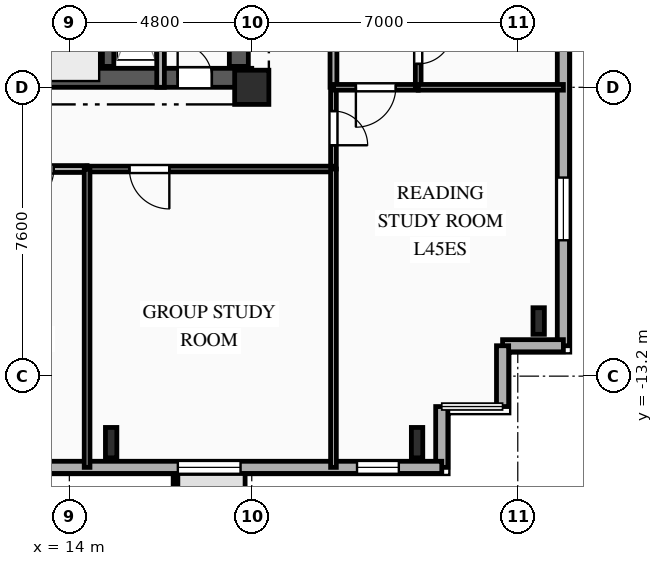
"""IFC4 building model, lengths in metres.
Left out: names, types, materials, properties, quantities, classifications, styles, units other than length and angle.
Written with IfcOpenShell. Run it as: python <this file> out.ifc"""

import sys

from ifc_helpers import new_model, si_unit, direction, frame, frame_2d, origin, origin_2d, place, context, subcontext, project, spatial, rectangle, i_section, extrude, element, fill, save


model = new_model("IFC4")
c1 = context("Model", 3, precision=1e-05, world=origin(), true_north=direction((0.0, 1.0)))
c2 = subcontext(c1, "Body", "Model", "MODEL_VIEW")
j1 = project(units=[si_unit("LENGTHUNIT", "METRE"), si_unit("PLANEANGLEUNIT", "RADIAN")], contexts=[c1])
p1 = place(None, origin())
s1 = spatial("IfcSite", under=j1, at=p1, CompositionType="ELEMENT")
p2 = place(p1, origin())
s2 = spatial("IfcBuilding", under=s1, at=p2, CompositionType="ELEMENT")
p3 = place(p2, frame((0.0, 0.0, 161.15)))
s3 = spatial("IfcBuildingStorey", under=s2, at=p3, CompositionType="ELEMENT", Elevation=161.15)
p4 = place(p3, frame((18.8, -5.6, 0.0), z_axis=(0.0, 0.0, 1.0), x_axis=(1.0, 0.0, 0.0)))
e1 = element("IfcColumn", 1, at=p4, inside=s3, PredefinedType="COLUMN", context=c2, shape_type="SweptSolid", body=[
    extrude(rectangle(XDim=0.9, YDim=0.9, at=origin_2d()), origin(), (0.0, 0.0, 1.0), 3.35),
])
for number, where, z_axis, x_axis in (
    (2, (15.1, -14.95, 0.0), (0.0, 0.0, 1.0), (1.0, 0.0, 0.0)),
    (3, (23.15, -14.95, 0.0), (0.0, 0.0, 1.0), (1.0, 0.0, 0.0)),
):
    element("IfcColumn", number, at=place(p3, frame(where, z_axis=z_axis, x_axis=x_axis)), inside=s3, PredefinedType="COLUMN", context=c2, shape_type="SweptSolid", body=[
        extrude(i_section(OverallWidth=0.3, OverallDepth=0.8, WebThickness=0.018, FlangeThickness=0.033, FilletRadius=0.03, at=origin_2d()), origin(), (0.0, 0.0, 1.0), 3.35),
    ])
p5 = place(p3, frame((26.35, -11.75, 0.0), z_axis=(0.0, 0.0, 1.0), x_axis=(1.0, 0.0, 0.0)))
e4 = element("IfcColumn", 4, at=p5, inside=s3, PredefinedType="COLUMN", context=c2, shape_type="SweptSolid", body=[
    extrude(i_section(OverallWidth=0.3, OverallDepth=0.7, WebThickness=0.017, FlangeThickness=0.032, FilletRadius=0.027, at=origin_2d()), origin(), (0.0, 0.0, 1.0), 3.35),
])
p6 = place(p3, frame((27.0, 17.2, 0.0), z_axis=(0.0, 0.0, 1.0), x_axis=(0.0, -1.0, 0.0)))
e5 = element("IfcWall", 5, at=p6, inside=s3, PredefinedType="SOLIDWALL", context=c2, shape_type="SweptSolid", body=[
    extrude(rectangle(XDim=29.6, YDim=0.32, at=frame_2d((14.8, 0.0))), origin(), (0.0, 0.0, 1.0), 3.04),
])
p7 = place(p6, frame((3.775, 0.0, 0.85)))
e6 = element("IfcOpeningElement", 6, at=p7, cuts=e5, PredefinedType="OPENING", context=c2, shape_type="SweptSolid", body=[
    extrude(rectangle(XDim=1.65, YDim=1.85, at=frame_2d((0.825, 0.925))), frame((0.0, 0.17, 0.0), z_axis=(0.0, -1.0, 0.0), x_axis=(1.0, 0.0, 0.0)), (0.0, 0.0, 1.0), 0.34),
])
p8 = place(p6, frame((9.32, 0.0, 0.85)))
e7 = element("IfcOpeningElement", 7, at=p8, cuts=e5, PredefinedType="OPENING", context=c2, shape_type="SweptSolid", body=[
    extrude(rectangle(XDim=1.6, YDim=1.85, at=frame_2d((0.8, 0.925))), frame((0.0, 0.17, 0.0), z_axis=(0.0, -1.0, 0.0), x_axis=(1.0, 0.0, 0.0)), (0.0, 0.0, 1.0), 0.34),
])
p9 = place(p6, frame((12.2, 0.0, 0.85)))
e8 = element("IfcOpeningElement", 8, at=p9, cuts=e5, PredefinedType="OPENING", context=c2, shape_type="SweptSolid", body=[
    extrude(rectangle(XDim=1.6, YDim=1.85, at=frame_2d((0.8, 0.925))), frame((0.0, 0.17, 0.0), z_axis=(0.0, -1.0, 0.0), x_axis=(1.0, 0.0, 0.0)), (0.0, 0.0, 1.0), 0.34),
])
p10 = place(p6, frame((15.0, 0.0, 0.85)))
e9 = element("IfcOpeningElement", 9, at=p10, cuts=e5, PredefinedType="OPENING", context=c2, shape_type="SweptSolid", body=[
    extrude(rectangle(XDim=1.6, YDim=1.85, at=frame_2d((0.8, 0.925))), frame((0.0, 0.17, 0.0), z_axis=(0.0, -1.0, 0.0), x_axis=(1.0, 0.0, 0.0)), (0.0, 0.0, 1.0), 0.34),
])
p11 = place(p6, frame((17.865, 0.0, 0.85)))
e10 = element("IfcOpeningElement", 10, at=p11, cuts=e5, PredefinedType="OPENING", context=c2, shape_type="SweptSolid", body=[
    extrude(rectangle(XDim=1.95, YDim=1.85, at=frame_2d((0.975, 0.925))), frame((0.0, 0.17, 0.0), z_axis=(0.0, -1.0, 0.0), x_axis=(1.0, 0.0, 0.0)), (0.0, 0.0, 1.0), 0.34),
])
p12 = place(p6, frame((25.175, 0.0, 0.85)))
e11 = element("IfcOpeningElement", 11, at=p12, cuts=e5, PredefinedType="OPENING", context=c2, shape_type="SweptSolid", body=[
    extrude(rectangle(XDim=1.65, YDim=1.85, at=frame_2d((0.825, 0.925))), frame((0.0, 0.17, 0.0), z_axis=(0.0, -1.0, 0.0), x_axis=(1.0, 0.0, 0.0)), (0.0, 0.0, 1.0), 0.34),
])
for number, where, z_axis, x_axis in (
    (12, (27.0, -12.4, 0.0), (0.0, 0.0, 1.0), (-1.0, 0.0, 0.0)),
    (13, (25.4, -12.4, 0.0), (0.0, 0.0, 1.0), (0.0, -1.0, 0.0)),
    (14, (23.8, -14.0, 0.0), (0.0, 0.0, 1.0), (0.0, -1.0, 0.0)),
):
    element("IfcWall", number, at=place(p3, frame(where, z_axis=z_axis, x_axis=x_axis)), inside=s3, PredefinedType="SOLIDWALL", context=c2, shape_type="SweptSolid", body=[
        extrude(rectangle(XDim=1.6, YDim=0.32, at=frame_2d((0.8, 0.0))), origin(), (0.0, 0.0, 1.0), 3.04),
    ])
p13 = place(p3, frame((23.8, -15.6, 0.0), z_axis=(0.0, 0.0, 1.0), x_axis=(-1.0, 0.0, 0.0)))
e15 = element("IfcWall", 15, at=p13, inside=s3, PredefinedType="SOLIDWALL", context=c2, shape_type="SweptSolid", body=[
    extrude(rectangle(XDim=49.6, YDim=0.32, at=frame_2d((24.8, 0.0))), origin(), (0.0, 0.0, 1.0), 3.04),
])
p14 = place(p13, frame((1.13, 0.0, 0.85)))
e16 = element("IfcOpeningElement", 16, at=p14, cuts=e15, PredefinedType="OPENING", context=c2, shape_type="SweptSolid", body=[
    extrude(rectangle(XDim=1.1, YDim=1.85, at=frame_2d((0.55, 0.925))), frame((0.0, 0.17, 0.0), z_axis=(0.0, -1.0, 0.0), x_axis=(1.0, 0.0, 0.0)), (0.0, 0.0, 1.0), 0.34),
])
p15 = place(p13, frame((5.295, 0.0, 0.85)))
e17 = element("IfcOpeningElement", 17, at=p15, cuts=e15, PredefinedType="OPENING", context=c2, shape_type="SweptSolid", body=[
    extrude(rectangle(XDim=1.65, YDim=1.85, at=frame_2d((0.825, 0.925))), frame((0.0, 0.17, 0.0), z_axis=(0.0, -1.0, 0.0), x_axis=(1.0, 0.0, 0.0)), (0.0, 0.0, 1.0), 0.34),
])
p16 = place(p13, frame((11.74, 0.0, 0.85)))
e18 = element("IfcOpeningElement", 18, at=p16, cuts=e15, PredefinedType="OPENING", context=c2, shape_type="SweptSolid", body=[
    extrude(rectangle(XDim=2.2, YDim=1.85, at=frame_2d((1.1, 0.925))), frame((0.0, 0.17, 0.0), z_axis=(0.0, -1.0, 0.0), x_axis=(1.0, 0.0, 0.0)), (0.0, 0.0, 1.0), 0.34),
])
p17 = place(p13, frame((18.74, 0.0, 0.85)))
e19 = element("IfcOpeningElement", 19, at=p17, cuts=e15, PredefinedType="OPENING", context=c2, shape_type="SweptSolid", body=[
    extrude(rectangle(XDim=2.2, YDim=1.85, at=frame_2d((1.1, 0.925))), frame((0.0, 0.17, 0.0), z_axis=(0.0, -1.0, 0.0), x_axis=(1.0, 0.0, 0.0)), (0.0, 0.0, 1.0), 0.34),
])
p18 = place(p13, frame((25.74, 0.0, 0.85)))
e20 = element("IfcOpeningElement", 20, at=p18, cuts=e15, PredefinedType="OPENING", context=c2, shape_type="SweptSolid", body=[
    extrude(rectangle(XDim=2.2, YDim=1.85, at=frame_2d((1.1, 0.925))), frame((0.0, 0.17, 0.0), z_axis=(0.0, -1.0, 0.0), x_axis=(1.0, 0.0, 0.0)), (0.0, 0.0, 1.0), 0.34),
])
p19 = place(p13, frame((33.348, 0.0, 0.85)))
e21 = element("IfcOpeningElement", 21, at=p19, cuts=e15, PredefinedType="OPENING", context=c2, shape_type="SweptSolid", body=[
    extrude(rectangle(XDim=2.2, YDim=1.85, at=frame_2d((1.1, 0.925))), frame((0.0, 0.17, 0.0), z_axis=(0.0, -1.0, 0.0), x_axis=(1.0, 0.0, 0.0)), (0.0, 0.0, 1.0), 0.34),
])
p20 = place(p13, frame((38.972, 0.0, 0.85)))
e22 = element("IfcOpeningElement", 22, at=p20, cuts=e15, PredefinedType="OPENING", context=c2, shape_type="SweptSolid", body=[
    extrude(rectangle(XDim=1.65, YDim=1.85, at=frame_2d((0.825, 0.925))), frame((0.0, 0.17, 0.0), z_axis=(0.0, -1.0, 0.0), x_axis=(1.0, 0.0, 0.0)), (0.0, 0.0, 1.0), 0.34),
])
p21 = place(p13, frame((45.895, 0.0, 0.85)))
e23 = element("IfcOpeningElement", 23, at=p21, cuts=e15, PredefinedType="OPENING", context=c2, shape_type="SweptSolid", body=[
    extrude(rectangle(XDim=1.65, YDim=1.85, at=frame_2d((0.825, 0.925))), frame((0.0, 0.17, 0.0), z_axis=(0.0, -1.0, 0.0), x_axis=(1.0, 0.0, 0.0)), (0.0, 0.0, 1.0), 0.34),
])
p22 = place(p3, frame((9.2, -5.35, 0.0), z_axis=(0.0, 0.0, 1.0), x_axis=(1.0, 0.0, 0.0)))
e24 = element("IfcWall", 24, at=p22, inside=s3, PredefinedType="SHEAR", context=c2, shape_type="SweptSolid", body=[
    extrude(rectangle(XDim=9.6, YDim=0.5, at=frame_2d((4.8, 0.0))), origin(), (0.0, 0.0, 1.0), 3.04),
])
p23 = place(p22, frame((7.65, 0.0, 0.0)))
e25 = element("IfcOpeningElement", 25, at=p23, cuts=e24, PredefinedType="OPENING", context=c2, shape_type="SweptSolid", body=[
    extrude(rectangle(XDim=0.9, YDim=2.1, at=frame_2d((0.45, 1.05))), frame((0.0, 0.26, 0.0), z_axis=(0.0, -1.0, 0.0), x_axis=(1.0, 0.0, 0.0)), (0.0, 0.0, 1.0), 0.52),
])
p24 = place(p3, frame((18.46, -5.05, 0.0), z_axis=(0.0, 0.0, 1.0), x_axis=(0.0, 1.0, 0.0)))
e26 = element("IfcWall", 26, at=p24, inside=s3, PredefinedType="SHEAR", context=c2, shape_type="SweptSolid", body=[
    extrude(rectangle(XDim=10.1, YDim=0.5, at=frame_2d((5.05, 0.0))), origin(), (0.0, 0.0, 1.0), 3.04),
])
p25 = place(p3, frame((15.02, -5.05, 0.0), z_axis=(0.0, 0.0, 1.0), x_axis=(0.0, 1.0, 0.0)))
e27 = element("IfcWall", 27, at=p25, inside=s3, PredefinedType="SHEAR", context=c2, shape_type="SweptSolid", body=[
    extrude(rectangle(XDim=10.1, YDim=0.3, at=frame_2d((5.05, 0.0))), origin(), (0.0, 0.0, 1.0), 3.04),
])
p26 = place(p3, frame((16.4, -2.11, 0.0), z_axis=(0.0, 0.0, 1.0), x_axis=(0.0, -1.0, 0.0)))
e28 = element("IfcWall", 28, at=p26, inside=s3, PredefinedType="PARTITIONING", context=c2, shape_type="SweptSolid", body=[
    extrude(rectangle(XDim=3.49, YDim=0.2, at=frame_2d((1.745, 0.0))), origin(), (0.0, 0.0, 1.0), 3.04),
])
p27 = place(p3, frame((20.95, -5.6, 0.0), z_axis=(0.0, 0.0, 1.0), x_axis=(0.0, -1.0, 0.0)))
e29 = element("IfcWall", 29, at=p27, inside=s3, PredefinedType="PARTITIONING", context=c2, shape_type="SweptSolid", body=[
    extrude(rectangle(XDim=2.15, YDim=0.15, at=frame_2d((1.075, 0.0))), origin(), (0.0, 0.0, 1.0), 3.04),
])
p28 = place(p27, frame((0.625, 0.0, 0.0)))
e30 = element("IfcOpeningElement", 30, at=p28, cuts=e29, PredefinedType="OPENING", context=c2, shape_type="SweptSolid", body=[
    extrude(rectangle(XDim=0.9, YDim=2.1, at=frame_2d((0.45, 1.05))), frame((0.0, 0.085, 0.0), z_axis=(0.0, -1.0, 0.0), x_axis=(1.0, 0.0, 0.0)), (0.0, 0.0, 1.0), 0.17),
])
p29 = place(p3, frame((14.467, -7.75, 0.0), z_axis=(0.0, 0.0, 1.0), x_axis=(-1.0, 0.0, 0.0)))
e31 = element("IfcWall", 31, at=p29, inside=s3, PredefinedType="PARTITIONING", context=c2, shape_type="SweptSolid", body=[
    extrude(rectangle(XDim=4.534, YDim=0.18, at=frame_2d((2.267, 0.0))), origin(), (0.0, 0.0, 1.0), 3.04),
])
p30 = place(p29, frame((0.877, 0.0, 0.0)))
e32 = element("IfcOpeningElement", 32, at=p30, cuts=e31, PredefinedType="OPENING", context=c2, shape_type="SweptSolid", body=[
    extrude(rectangle(XDim=1.0, YDim=2.15, at=frame_2d((0.5, 1.075))), frame((0.0, 0.1, 0.0), z_axis=(0.0, -1.0, 0.0), x_axis=(1.0, 0.0, 0.0)), (0.0, 0.0, 1.0), 0.2),
])
p31 = place(p3, frame((20.95, -7.75, 0.0), z_axis=(0.0, 0.0, 1.0), x_axis=(-1.0, 0.0, 0.0)))
e33 = element("IfcWall", 33, at=p31, inside=s3, PredefinedType="PARTITIONING", context=c2, shape_type="SweptSolid", body=[
    extrude(rectangle(XDim=6.483, YDim=0.15, at=frame_2d((3.241, 0.0))), origin(), (0.0, 0.0, 1.0), 3.04),
])
p32 = place(p31, frame((4.319, 0.0, 0.0)))
e34 = element("IfcOpeningElement", 34, at=p32, cuts=e33, PredefinedType="OPENING", context=c2, shape_type="SweptSolid", body=[
    extrude(rectangle(XDim=1.05, YDim=2.15, at=frame_2d((0.525, 1.075))), frame((0.0, 0.085, 0.0), z_axis=(0.0, -1.0, 0.0), x_axis=(1.0, 0.0, 0.0)), (0.0, 0.0, 1.0), 0.17),
])
p33 = place(p3, frame((20.95, 8.5, 0.0), z_axis=(0.0, 0.0, 1.0), x_axis=(0.0, -1.0, 0.0)))
e35 = element("IfcWall", 35, at=p33, inside=s3, PredefinedType="PARTITIONING", context=c2, shape_type="SweptSolid", body=[
    extrude(rectangle(XDim=14.1, YDim=0.18, at=frame_2d((7.05, 0.0))), origin(), (0.0, 0.0, 1.0), 3.04),
])
p34 = place(p33, frame((8.042, 0.0, 0.0)))
e36 = element("IfcOpeningElement", 36, at=p34, cuts=e35, PredefinedType="OPENING", context=c2, shape_type="SweptSolid", body=[
    extrude(rectangle(XDim=1.0, YDim=2.15, at=frame_2d((0.5, 1.075))), frame((0.0, 0.1, 0.0), z_axis=(0.0, -1.0, 0.0), x_axis=(1.0, 0.0, 0.0)), (0.0, 0.0, 1.0), 0.2),
])
p35 = place(p3, frame((23.18, -5.6, 0.0), z_axis=(0.0, 0.0, 1.0), x_axis=(-1.0, 0.0, 0.0)))
e37 = element("IfcWall", 37, at=p35, inside=s3, PredefinedType="PARTITIONING", context=c2, shape_type="SweptSolid", body=[
    extrude(rectangle(XDim=2.23, YDim=0.15, at=frame_2d((1.115, 0.0))), origin(), (0.0, 0.0, 1.0), 3.04),
])
p36 = place(p35, frame((0.59, 0.0, 0.0)))
e38 = element("IfcOpeningElement", 38, at=p36, cuts=e37, PredefinedType="OPENING", context=c2, shape_type="SweptSolid", body=[
    extrude(rectangle(XDim=1.05, YDim=2.15, at=frame_2d((0.525, 1.075))), frame((0.0, 0.085, 0.0), z_axis=(0.0, -1.0, 0.0), x_axis=(1.0, 0.0, 0.0)), (0.0, 0.0, 1.0), 0.17),
])
p37 = place(p3, frame((23.18, -3.25, 0.0), z_axis=(0.0, 0.0, 1.0), x_axis=(0.0, -1.0, 0.0)))
e39 = element("IfcWall", 39, at=p37, inside=s3, PredefinedType="PLUMBINGWALL", context=c2, shape_type="SweptSolid", body=[
    extrude(rectangle(XDim=2.35, YDim=0.15, at=frame_2d((1.175, 0.0))), origin(), (0.0, 0.0, 1.0), 3.04),
])
p38 = place(p37, frame((0.834, 0.0, 0.0)))
e40 = element("IfcOpeningElement", 40, at=p38, cuts=e39, PredefinedType="OPENING", context=c2, shape_type="SweptSolid", body=[
    extrude(rectangle(XDim=0.9, YDim=2.1, at=frame_2d((0.45, 1.05))), frame((0.0, 0.085, 0.0), z_axis=(0.0, -1.0, 0.0), x_axis=(1.0, 0.0, 0.0)), (0.0, 0.0, 1.0), 0.17),
])
p39 = place(p3, frame((23.18, -5.6, 0.0), z_axis=(0.0, 0.0, 1.0), x_axis=(1.0, 0.0, 0.0)))
e41 = element("IfcWall", 41, at=p39, inside=s3, PredefinedType="PLUMBINGWALL", context=c2, shape_type="SweptSolid", body=[
    extrude(rectangle(XDim=3.82, YDim=0.15, at=frame_2d((1.91, 0.0))), origin(), (0.0, 0.0, 1.0), 3.04),
])
for number, where, z_axis, x_axis in (
    (42, (20.95, -15.6, 0.0), (0.0, 0.0, 1.0), (0.0, 1.0, 0.0)),
    (43, (14.467, -7.75, 0.0), (0.0, 0.0, 1.0), (0.0, -1.0, 0.0)),
):
    element("IfcWall", number, at=place(p3, frame(where, z_axis=z_axis, x_axis=x_axis)), inside=s3, PredefinedType="PARTITIONING", context=c2, shape_type="SweptSolid", body=[
        extrude(rectangle(XDim=7.85, YDim=0.15, at=frame_2d((3.925, 0.0))), origin(), (0.0, 0.0, 1.0), 3.04),
    ])
p40 = place(p12, origin())
e44 = element("IfcWindow", 44, at=p40, inside=s3, PartitioningType="SINGLE_PANEL", PredefinedType="WINDOW", context=c2, shape_type="SweptSolid", body=[
    extrude(rectangle(XDim=1.65, YDim=1.85, at=frame_2d((0.825, 0.925))), frame((0.0, 0.03, 0.0), z_axis=(0.0, -1.0, 0.0), x_axis=(1.0, 0.0, 0.0)), (0.0, 0.0, 1.0), 0.06),
])
fill(e11, e44)
p41 = place(p14, origin())
e45 = element("IfcWindow", 45, at=p41, inside=s3, PartitioningType="SINGLE_PANEL", PredefinedType="WINDOW", context=c2, shape_type="SweptSolid", body=[
    extrude(rectangle(XDim=1.1, YDim=1.85, at=frame_2d((0.55, 0.925))), frame((0.0, 0.03, 0.0), z_axis=(0.0, -1.0, 0.0), x_axis=(1.0, 0.0, 0.0)), (0.0, 0.0, 1.0), 0.06),
])
fill(e16, e45)
p42 = place(p15, origin())
e46 = element("IfcWindow", 46, at=p42, inside=s3, PartitioningType="SINGLE_PANEL", PredefinedType="WINDOW", context=c2, shape_type="SweptSolid", body=[
    extrude(rectangle(XDim=1.65, YDim=1.85, at=frame_2d((0.825, 0.925))), frame((0.0, 0.03, 0.0), z_axis=(0.0, -1.0, 0.0), x_axis=(1.0, 0.0, 0.0)), (0.0, 0.0, 1.0), 0.06),
])
fill(e17, e46)
p43 = place(p23, origin())
e47 = element("IfcDoor", 47, at=p43, inside=s3, OperationType="SINGLE_SWING_LEFT", PredefinedType="DOOR", context=c2, shape_type="SweptSolid", body=[
    extrude(rectangle(XDim=0.9, YDim=2.1, at=frame_2d((0.45, 1.05))), frame((0.0, 0.025, 0.0), z_axis=(0.0, -1.0, 0.0), x_axis=(1.0, 0.0, 0.0)), (0.0, 0.0, 1.0), 0.05),
])
fill(e25, e47)
p44 = place(p28, origin())
e48 = element("IfcDoor", 48, at=p44, inside=s3, OperationType="SINGLE_SWING_RIGHT", PredefinedType="DOOR", context=c2, shape_type="SweptSolid", body=[
    extrude(rectangle(XDim=0.9, YDim=2.1, at=frame_2d((0.45, 1.05))), frame((0.0, 0.025, 0.0), z_axis=(0.0, -1.0, 0.0), x_axis=(1.0, 0.0, 0.0)), (0.0, 0.0, 1.0), 0.05),
])
fill(e30, e48)
p45 = place(p30, origin())
e49 = element("IfcDoor", 49, at=p45, inside=s3, OperationType="SINGLE_SWING_RIGHT", PredefinedType="DOOR", context=c2, shape_type="SweptSolid", body=[
    extrude(rectangle(XDim=1.0, YDim=2.15, at=frame_2d((0.5, 1.075))), frame((0.0, 0.025, 0.0), z_axis=(0.0, -1.0, 0.0), x_axis=(1.0, 0.0, 0.0)), (0.0, 0.0, 1.0), 0.05),
])
fill(e32, e49)
p46 = place(p32, origin())
e50 = element("IfcDoor", 50, at=p46, inside=s3, OperationType="SINGLE_SWING_LEFT", PredefinedType="DOOR", context=c2, shape_type="SweptSolid", body=[
    extrude(rectangle(XDim=1.05, YDim=2.15, at=frame_2d((0.525, 1.075))), frame((0.0, 0.025, 0.0), z_axis=(0.0, -1.0, 0.0), x_axis=(1.0, 0.0, 0.0)), (0.0, 0.0, 1.0), 0.05),
])
fill(e34, e50)
p47 = place(p36, origin())
e51 = element("IfcDoor", 51, at=p47, inside=s3, OperationType="SINGLE_SWING_RIGHT", PredefinedType="DOOR", context=c2, shape_type="SweptSolid", body=[
    extrude(rectangle(XDim=1.05, YDim=2.15, at=frame_2d((0.525, 1.075))), frame((0.0, 0.025, 0.0), z_axis=(0.0, -1.0, 0.0), x_axis=(1.0, 0.0, 0.0)), (0.0, 0.0, 1.0), 0.05),
])
fill(e38, e51)
p48 = place(p38, origin())
e52 = element("IfcDoor", 52, at=p48, inside=s3, OperationType="SINGLE_SWING_LEFT", PredefinedType="DOOR", context=c2, shape_type="SweptSolid", body=[
    extrude(rectangle(XDim=0.9, YDim=2.1, at=frame_2d((0.45, 1.05))), frame((0.0, 0.025, 0.0), z_axis=(0.0, -1.0, 0.0), x_axis=(1.0, 0.0, 0.0)), (0.0, 0.0, 1.0), 0.05),
])
fill(e40, e52)
save(model, sys.argv[1])
